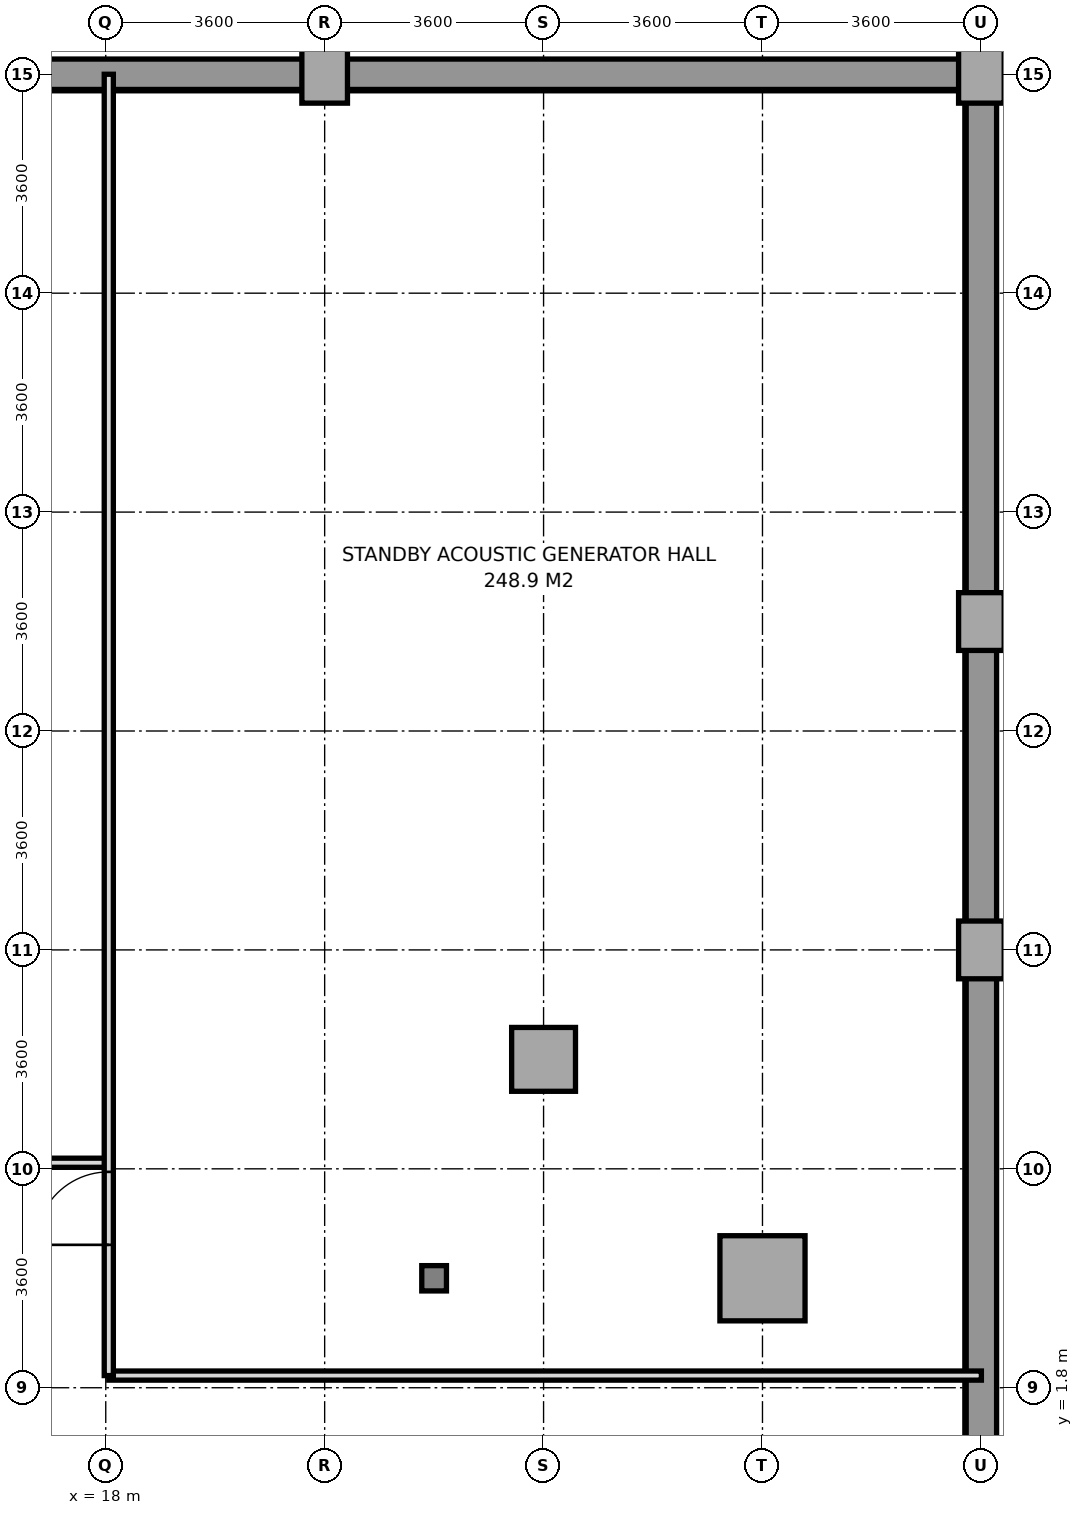
"""IFC4 building model, lengths in metres.
Left out: names, types, materials, properties, quantities, classifications, styles, units other than length and angle.
Written with IfcOpenShell. Run it as: python <this file> out.ifc"""

import sys

from ifc_helpers import new_model, si_unit, direction, frame, frame_2d, origin, origin_2d, place, context, subcontext, project, spatial, rectangle, i_section, extrude, source, transform, mapped, element, fill, save


model = new_model("IFC4")
c1 = context("Model", 3, precision=1e-05, world=origin(), true_north=direction((0.0, 1.0)))
c2 = subcontext(c1, "Body", "Model", "MODEL_VIEW")
j1 = project(units=[si_unit("LENGTHUNIT", "METRE"), si_unit("PLANEANGLEUNIT", "RADIAN")], contexts=[c1])
p1 = place(None, origin())
s1 = spatial("IfcSite", under=j1, at=p1, CompositionType="ELEMENT")
p2 = place(p1, origin())
s2 = spatial("IfcBuilding", under=s1, at=p2, CompositionType="ELEMENT")
p3 = place(p2, frame((0.0, 0.0, -8.4)))
s3 = spatial("IfcBuildingStorey", under=s2, at=p3, CompositionType="ELEMENT", Elevation=-8.4)
m1 = source(origin(), c2, "Body", "SweptSolid", [
    extrude(rectangle(XDim=0.75, YDim=0.95, at=origin_2d()), origin(), (0.0, 0.0, 1.0), 4.12),
])
p4 = place(p3, frame((21.6, 23.4, -0.2), z_axis=(0.0, 0.0, 1.0), x_axis=(1.0, 0.0, 0.0)))
e1 = element("IfcColumn", 1, at=p4, inside=s3, PredefinedType="COLUMN", context=c2, shape_type="MappedRepresentation", body=[
    mapped(m1, transform((0.0, 0.0, 0.0), x_axis=(1.0, 0.0, 0.0), y_axis=(0.0, 1.0, 0.0), z_axis=(0.0, 0.0, 1.0), scale=1.0)),
])
m2 = source(origin(), c2, "Body", "SweptSolid", [
    extrude(i_section(OverallWidth=0.406, OverallDepth=0.416, WebThickness=0.024, FlangeThickness=0.039, at=origin_2d()), origin(), (0.0, 0.0, 1.0), 4.12),
])
p5 = place(p3, frame((23.4, 3.6, -0.2), z_axis=(0.0, 0.0, 1.0), x_axis=(1.0, 0.0, 0.0)))
e2 = element("IfcColumn", 2, at=p5, inside=s3, PredefinedType="COLUMN", context=c2, shape_type="MappedRepresentation", body=[
    mapped(m2, transform((0.0, 0.0, 0.0), x_axis=(1.0, 0.0, 0.0), y_axis=(0.0, 1.0, 0.0), z_axis=(0.0, 0.0, 1.0), scale=1.0)),
])
m3 = source(origin(), c2, "Body", "SweptSolid", [
    extrude(rectangle(XDim=1.05, YDim=1.05, at=origin_2d()), origin(), (0.0, 0.0, 1.0), 4.12),
])
p6 = place(p3, frame((25.2, 7.2, -0.2), z_axis=(0.0, 0.0, 1.0), x_axis=(1.0, 0.0, 0.0)))
e3 = element("IfcColumn", 3, at=p6, inside=s3, PredefinedType="COLUMN", context=c2, shape_type="MappedRepresentation", body=[
    mapped(m3, transform((0.0, 0.0, 0.0), x_axis=(1.0, 0.0, 0.0), y_axis=(0.0, 1.0, 0.0), z_axis=(0.0, 0.0, 1.0), scale=1.0)),
])
m4 = source(origin(), c2, "Body", "SweptSolid", [
    extrude(rectangle(XDim=1.4, YDim=1.4, at=origin_2d()), origin(), (0.0, 0.0, 1.0), 4.12),
])
p7 = place(p3, frame((28.8, 3.6, -0.2), z_axis=(0.0, 0.0, 1.0), x_axis=(1.0, 0.0, 0.0)))
e4 = element("IfcColumn", 4, at=p7, inside=s3, PredefinedType="COLUMN", context=c2, shape_type="MappedRepresentation", body=[
    mapped(m4, transform((0.0, 0.0, 0.0), x_axis=(1.0, 0.0, 0.0), y_axis=(0.0, 1.0, 0.0), z_axis=(0.0, 0.0, 1.0), scale=1.0)),
])
for number, where, z_axis, x_axis in (
    (5, (32.4, 9.0, -0.2), (0.0, 0.0, 1.0), (1.0, 0.0, 0.0)),
    (6, (32.4, 14.4, -0.2), (0.0, 0.0, 1.0), (1.0, 0.0, 0.0)),
    (7, (32.4, 23.4, -0.2), (0.0, 0.0, 1.0), (1.0, 0.0, 0.0)),
):
    element("IfcColumn", number, at=place(p3, frame(where, z_axis=z_axis, x_axis=x_axis)), inside=s3, PredefinedType="COLUMN", context=c2, shape_type="MappedRepresentation", body=[
        mapped(m1, transform((0.0, 0.0, 0.0), x_axis=(1.0, 0.0, 0.0), y_axis=(0.0, 1.0, 0.0), z_axis=(0.0, 0.0, 1.0), scale=1.0)),
    ])
p8 = place(p3, frame((32.4, -19.8, -0.2), z_axis=(0.0, 0.0, 1.0), x_axis=(0.0, 1.0, 0.0)))
e8 = element("IfcWall", 8, at=p8, inside=s3, PredefinedType="USERDEFINED", context=c2, shape_type="SweptSolid", body=[
    extrude(rectangle(XDim=43.2, YDim=0.5, at=frame_2d((21.6, 0.0))), origin(), (0.0, 0.0, 1.0), 4.12),
])
p9 = place(p3, frame((32.4, 23.4, -0.2), z_axis=(0.0, 0.0, 1.0), x_axis=(-1.0, 0.0, 0.0)))
e9 = element("IfcWall", 9, at=p9, inside=s3, PredefinedType="USERDEFINED", context=c2, shape_type="SweptSolid", body=[
    extrude(rectangle(XDim=64.8, YDim=0.5, at=frame_2d((32.4, 0.0))), origin(), (0.0, 0.0, 1.0), 4.12),
])
p10 = place(p3, frame((13.2, 5.5, 0.0), z_axis=(0.0, 0.0, 1.0), x_axis=(1.0, 0.0, 0.0)))
e10 = element("IfcWall", 10, at=p10, inside=s3, PredefinedType="PARTITIONING", context=c2, shape_type="SweptSolid", body=[
    extrude(rectangle(XDim=4.85, YDim=0.15, at=frame_2d((2.425, 0.0))), origin(), (0.0, 0.0, 1.0), 3.33),
])
p11 = place(p3, frame((18.05, 2.0, 0.0), z_axis=(0.0, 0.0, 1.0), x_axis=(1.0, 0.0, 0.0)))
e11 = element("IfcWall", 11, at=p11, inside=s3, PredefinedType="PARTITIONING", context=c2, shape_type="SweptSolid", body=[
    extrude(rectangle(XDim=14.35, YDim=0.15, at=frame_2d((7.175, 0.0))), origin(), (0.0, 0.0, 1.0), 3.33),
])
p12 = place(p3, frame((18.05, 2.0, 0.0), z_axis=(0.0, 0.0, 1.0), x_axis=(0.0, 1.0, 0.0)))
e12 = element("IfcWall", 12, at=p12, inside=s3, PredefinedType="PARTITIONING", context=c2, shape_type="SweptSolid", body=[
    extrude(rectangle(XDim=21.4, YDim=0.15, at=frame_2d((10.7, 0.0))), origin(), (0.0, 0.0, 1.0), 3.27),
])
p13 = place(p12, frame((2.15, 0.0, 0.0)))
e13 = element("IfcOpeningElement", 13, at=p13, cuts=e12, PredefinedType="OPENING", context=c2, shape_type="SweptSolid", body=[
    extrude(rectangle(XDim=1.2, YDim=2.2, at=frame_2d((0.6, 1.1))), frame((0.0, 0.085, 0.0), z_axis=(0.0, -1.0, 0.0), x_axis=(1.0, 0.0, 0.0)), (0.0, 0.0, 1.0), 0.17),
])
m5 = source(origin(), c2, "Body", "SweptSolid", [
    extrude(rectangle(XDim=1.2, YDim=2.2, at=frame_2d((0.6, 1.1))), frame((0.0, 0.025, 0.0), z_axis=(0.0, -1.0, 0.0), x_axis=(1.0, 0.0, 0.0)), (0.0, 0.0, 1.0), 0.05),
])
p14 = place(p13, origin())
e14 = element("IfcDoor", 14, at=p14, inside=s3, OperationType="SINGLE_SWING_LEFT", PredefinedType="DOOR", context=c2, shape_type="MappedRepresentation", body=[
    mapped(m5, transform((0.0, 0.0, 0.0), x_axis=(1.0, 0.0, 0.0), y_axis=(0.0, 1.0, 0.0), z_axis=(0.0, 0.0, 1.0), scale=1.0)),
])
fill(e13, e14)
save(model, sys.argv[1])
